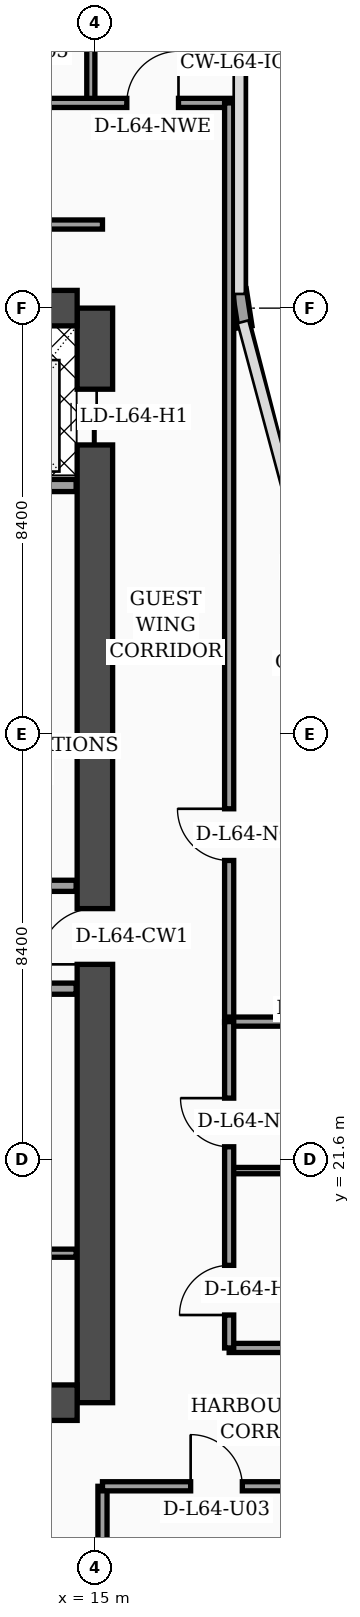
"""IFC4 building model, lengths in metres.
Left out: names, types, materials, properties, quantities, classifications, styles, units other than length and angle.
Written with IfcOpenShell. Run it as: python <this file> out.ifc"""

import sys

from ifc_helpers import new_model, si_unit, direction, frame, frame_2d, origin, place, context, subcontext, project, spatial, rectangle, extrude, element, fill, save


model = new_model("IFC4")
c1 = context("Model", 3, precision=1e-05, world=origin(), true_north=direction((0.0, 1.0)))
c2 = subcontext(c1, "Body", "Model", "MODEL_VIEW")
j1 = project(units=[si_unit("LENGTHUNIT", "METRE"), si_unit("PLANEANGLEUNIT", "RADIAN")], contexts=[c1])
p1 = place(None, origin())
s1 = spatial("IfcSite", under=j1, at=p1, CompositionType="ELEMENT")
p2 = place(p1, origin())
s2 = spatial("IfcBuilding", under=s1, at=p2, CompositionType="ELEMENT")
p3 = place(p2, frame((0.0, 0.0, 259.0)))
s3 = spatial("IfcBuildingStorey", under=s2, at=p3, CompositionType="ELEMENT", Elevation=259.0)
p4 = place(p3, frame((15.0, 16.8, 0.0), z_axis=(0.0, 0.0, 1.0), x_axis=(0.0, 1.0, 0.0)))
e1 = element("IfcWall", 1, at=p4, inside=s3, PredefinedType="SHEAR", context=c2, shape_type="SweptSolid", body=[
    extrude(rectangle(XDim=21.6, YDim=0.7, at=frame_2d((10.8, 0.0))), origin(), (0.0, 0.0, 1.0), 4.05),
])
p5 = place(p4, frame((8.65, 0.0, 0.0)))
e2 = element("IfcOpeningElement", 2, at=p5, cuts=e1, PredefinedType="OPENING", context=c2, shape_type="SweptSolid", body=[
    extrude(rectangle(XDim=1.1, YDim=2.2, at=frame_2d((0.55, 1.1))), frame((0.0, 0.36, 0.0), z_axis=(0.0, -1.0, 0.0), x_axis=(1.0, 0.0, 0.0)), (0.0, 0.0, 1.0), 0.72),
])
p6 = place(p4, frame((18.9, 0.0, 0.0)))
e3 = element("IfcOpeningElement", 3, at=p6, cuts=e1, PredefinedType="OPENING", context=c2, shape_type="SweptSolid", body=[
    extrude(rectangle(XDim=1.1, YDim=2.2, at=frame_2d((0.55, 1.1))), frame((0.0, 0.36, 0.0), z_axis=(0.0, -1.0, 0.0), x_axis=(1.0, 0.0, 0.0)), (0.0, 0.0, 1.0), 0.72),
])
p7 = place(p3, frame((4.55, 38.4, 0.0), z_axis=(0.0, 0.0, 1.0), x_axis=(1.0, 0.0, 0.0)))
e4 = element("IfcWall", 4, at=p7, inside=s3, PredefinedType="SHEAR", context=c2, shape_type="SweptSolid", body=[
    extrude(rectangle(XDim=10.1, YDim=0.7, at=frame_2d((5.05, 0.0))), origin(), (0.0, 0.0, 1.0), 4.05),
])
p8 = place(p7, frame((5.75, 0.0, 0.0)))
e5 = element("IfcOpeningElement", 5, at=p8, cuts=e4, PredefinedType="OPENING", context=c2, shape_type="SweptSolid", body=[
    extrude(rectangle(XDim=1.1, YDim=2.2, at=frame_2d((0.55, 1.1))), frame((0.0, 0.36, 0.0), z_axis=(0.0, -1.0, 0.0), x_axis=(1.0, 0.0, 0.0)), (0.0, 0.0, 1.0), 0.72),
])
p9 = place(p3, frame((4.55, 16.8, 0.0), z_axis=(0.0, 0.0, 1.0), x_axis=(1.0, 0.0, 0.0)))
e6 = element("IfcWall", 6, at=p9, inside=s3, PredefinedType="SHEAR", context=c2, shape_type="SweptSolid", body=[
    extrude(rectangle(XDim=10.1, YDim=0.7, at=frame_2d((5.05, 0.0))), origin(), (0.0, 0.0, 1.0), 4.05),
])
p10 = place(p3, frame((17.962, 38.03, 0.0), z_axis=(0.0, 0.0, 1.0), x_axis=(-0.15141125477, 0.988470855377, 0.0)))
e7 = element("IfcWall", 7, at=p10, inside=s3, PredefinedType="SOLIDWALL", context=c2, shape_type="SweptSolid", body=[
    extrude(rectangle(XDim=0.739, YDim=0.28, at=frame_2d((0.369, 0.0))), origin(), (0.0, 0.0, 1.0), 4.05),
])
p11 = place(p3, frame((9.68, 19.75, 0.0), z_axis=(0.0, 0.0, 1.0), x_axis=(1.0, 0.0, 0.0)))
e8 = element("IfcWall", 8, at=p11, inside=s3, PredefinedType="PARTITIONING", context=c2, shape_type="SweptSolid", body=[
    extrude(rectangle(XDim=4.95, YDim=0.16, at=frame_2d((2.475, 0.0))), origin(), (0.0, 0.0, 1.0), 4.05),
])
p12 = place(p11, frame((1.1, 0.0, 0.0)))
e9 = element("IfcOpeningElement", 9, at=p12, cuts=e8, PredefinedType="OPENING", context=c2, shape_type="SweptSolid", body=[
    extrude(rectangle(XDim=0.98, YDim=2.15, at=frame_2d((0.49, 1.075))), frame((0.0, 0.09, 0.0), z_axis=(0.0, -1.0, 0.0), x_axis=(1.0, 0.0, 0.0)), (0.0, 0.0, 1.0), 0.18),
])
p13 = place(p3, frame((9.68, 24.97, 0.0), z_axis=(0.0, 0.0, 1.0), x_axis=(1.0, 0.0, 0.0)))
e10 = element("IfcWall", 10, at=p13, inside=s3, PredefinedType="SOLIDWALL", context=c2, shape_type="SweptSolid", body=[
    extrude(rectangle(XDim=4.95, YDim=0.22, at=frame_2d((2.475, 0.0))), origin(), (0.0, 0.0, 1.0), 3.5),
])
p14 = place(p13, frame((0.9, 0.0, 0.0)))
e11 = element("IfcOpeningElement", 11, at=p14, cuts=e10, PredefinedType="OPENING", context=c2, shape_type="SweptSolid", body=[
    extrude(rectangle(XDim=0.98, YDim=2.15, at=frame_2d((0.49, 1.075))), frame((0.0, 0.12, 0.0), z_axis=(0.0, -1.0, 0.0), x_axis=(1.0, 0.0, 0.0)), (0.0, 0.0, 1.0), 0.24),
])
p15 = place(p3, frame((12.25, 27.0, 0.0), z_axis=(0.0, 0.0, 1.0), x_axis=(1.0, 0.0, 0.0)))
e12 = element("IfcWall", 12, at=p15, inside=s3, PredefinedType="SOLIDWALL", context=c2, shape_type="SweptSolid", body=[
    extrude(rectangle(XDim=2.38, YDim=0.22, at=frame_2d((1.19, 0.0))), origin(), (0.0, 0.0, 1.0), 4.05),
])
p16 = place(p3, frame((12.25, 29.8, 0.0), z_axis=(0.0, 0.0, 1.0), x_axis=(1.0, 0.0, 0.0)))
e13 = element("IfcWall", 13, at=p16, inside=s3, PredefinedType="PARTITIONING", context=c2, shape_type="SweptSolid", body=[
    extrude(rectangle(XDim=2.38, YDim=0.16, at=frame_2d((1.19, 0.0))), origin(), (0.0, 0.0, 1.0), 4.05),
])
p17 = place(p16, frame((0.55, 0.0, 0.0)))
e14 = element("IfcOpeningElement", 14, at=p17, cuts=e13, PredefinedType="OPENING", context=c2, shape_type="SweptSolid", body=[
    extrude(rectangle(XDim=0.98, YDim=2.15, at=frame_2d((0.49, 1.075))), frame((0.0, 0.09, 0.0), z_axis=(0.0, -1.0, 0.0), x_axis=(1.0, 0.0, 0.0)), (0.0, 0.0, 1.0), 0.18),
])
p18 = place(p3, frame((9.66, 34.9, 0.0), z_axis=(0.0, 0.0, 1.0), x_axis=(1.0, 0.0, 0.0)))
e15 = element("IfcWall", 15, at=p18, inside=s3, PredefinedType="SOLIDWALL", context=c2, shape_type="SweptSolid", body=[
    extrude(rectangle(XDim=4.97, YDim=0.24, at=frame_2d((2.485, 0.0))), origin(), (0.0, 0.0, 1.0), 4.05),
])
p19 = place(p3, frame((15.15, 2.44, 0.0), z_axis=(0.0, 0.0, 1.0), x_axis=(0.0, 1.0, 0.0)))
e16 = element("IfcWall", 16, at=p19, inside=s3, PredefinedType="PARTITIONING", context=c2, shape_type="SweptSolid", body=[
    extrude(rectangle(XDim=12.71, YDim=0.18, at=frame_2d((6.355, 0.0))), origin(), (0.0, 0.0, 1.0), 2.35),
])
p20 = place(p3, frame((15.15, 15.15, 0.0), z_axis=(0.0, 0.0, 1.0), x_axis=(1.0, 0.0, 0.0)))
e17 = element("IfcWall", 17, at=p20, inside=s3, PredefinedType="PARTITIONING", context=c2, shape_type="SweptSolid", body=[
    extrude(rectangle(XDim=6.45, YDim=0.18, at=frame_2d((3.225, 0.0))), origin(), (0.0, 0.0, 1.0), 2.35),
])
p21 = place(p20, frame((1.74, 0.0, 0.0)))
e18 = element("IfcOpeningElement", 18, at=p21, cuts=e17, PredefinedType="OPENING", context=c2, shape_type="SweptSolid", body=[
    extrude(rectangle(XDim=1.02, YDim=2.2, at=frame_2d((0.51, 1.1))), frame((0.0, 0.1, 0.0), z_axis=(0.0, -1.0, 0.0), x_axis=(1.0, 0.0, 0.0)), (0.0, 0.0, 1.0), 0.2),
])
p22 = place(p3, frame((14.92, 42.45, 0.0), z_axis=(0.0, 0.0, 1.0), x_axis=(0.0, 1.0, 0.0)))
e19 = element("IfcWall", 19, at=p22, inside=s3, PredefinedType="PARTITIONING", context=c2, shape_type="SweptSolid", body=[
    extrude(rectangle(XDim=5.35, YDim=0.16, at=frame_2d((2.675, 0.0))), origin(), (0.0, 0.0, 1.0), 3.6),
])
p23 = place(p3, frame((0.08, 42.45, 0.0), z_axis=(0.0, 0.0, 1.0), x_axis=(1.0, 0.0, 0.0)))
e20 = element("IfcWall", 20, at=p23, inside=s3, PredefinedType="PARTITIONING", context=c2, shape_type="SweptSolid", body=[
    extrude(rectangle(XDim=17.77, YDim=0.18, at=frame_2d((8.885, 0.0))), origin(), (0.0, 0.0, 1.0), 3.5),
])
p24 = place(p23, frame((0.9, 0.0, 0.0)))
e21 = element("IfcOpeningElement", 21, at=p24, cuts=e20, PredefinedType="OPENING", context=c2, shape_type="SweptSolid", body=[
    extrude(rectangle(XDim=1.02, YDim=2.2, at=frame_2d((0.51, 1.1))), frame((0.0, 0.1, 0.0), z_axis=(0.0, -1.0, 0.0), x_axis=(1.0, 0.0, 0.0)), (0.0, 0.0, 1.0), 0.2),
])
p25 = place(p23, frame((4.9, 0.0, 0.0)))
e22 = element("IfcOpeningElement", 22, at=p25, cuts=e20, PredefinedType="OPENING", context=c2, shape_type="SweptSolid", body=[
    extrude(rectangle(XDim=1.02, YDim=2.2, at=frame_2d((0.51, 1.1))), frame((0.0, 0.1, 0.0), z_axis=(0.0, -1.0, 0.0), x_axis=(1.0, 0.0, 0.0)), (0.0, 0.0, 1.0), 0.2),
])
p26 = place(p23, frame((10.78, 0.0, 0.0)))
e23 = element("IfcOpeningElement", 23, at=p26, cuts=e20, PredefinedType="OPENING", context=c2, shape_type="SweptSolid", body=[
    extrude(rectangle(XDim=1.02, YDim=2.2, at=frame_2d((0.51, 1.1))), frame((0.0, 0.1, 0.0), z_axis=(0.0, -1.0, 0.0), x_axis=(1.0, 0.0, 0.0)), (0.0, 0.0, 1.0), 0.2),
])
p27 = place(p23, frame((15.55, 0.0, 0.0)))
e24 = element("IfcOpeningElement", 24, at=p27, cuts=e20, PredefinedType="OPENING", context=c2, shape_type="SweptSolid", body=[
    extrude(rectangle(XDim=1.02, YDim=2.2, at=frame_2d((0.51, 1.1))), frame((0.0, 0.1, 0.0), z_axis=(0.0, -1.0, 0.0), x_axis=(1.0, 0.0, 0.0)), (0.0, 0.0, 1.0), 0.2),
])
p28 = place(p3, frame((17.65, 24.3, 0.0), z_axis=(0.0, 0.0, 1.0), x_axis=(0.0, 1.0, 0.0)))
e25 = element("IfcWall", 25, at=p28, inside=s3, PredefinedType="PARTITIONING", context=c2, shape_type="SweptSolid", body=[
    extrude(rectangle(XDim=18.15, YDim=0.18, at=frame_2d((9.075, 0.0))), origin(), (0.0, 0.0, 1.0), 3.5),
])
p29 = place(p28, frame((3.2, 0.0, 0.0)))
e26 = element("IfcOpeningElement", 26, at=p29, cuts=e25, PredefinedType="OPENING", context=c2, shape_type="SweptSolid", body=[
    extrude(rectangle(XDim=1.02, YDim=2.2, at=frame_2d((0.51, 1.1))), frame((0.0, 0.1, 0.0), z_axis=(0.0, -1.0, 0.0), x_axis=(1.0, 0.0, 0.0)), (0.0, 0.0, 1.0), 0.2),
])
p30 = place(p3, frame((3.83, 40.05, 0.0), z_axis=(0.0, 0.0, 1.0), x_axis=(1.0, 0.0, 0.0)))
e27 = element("IfcWall", 27, at=p30, inside=s3, PredefinedType="PARTITIONING", context=c2, shape_type="SweptSolid", body=[
    extrude(rectangle(XDim=11.32, YDim=0.18, at=frame_2d((5.66, 0.0))), origin(), (0.0, 0.0, 1.0), 3.5),
])
p31 = place(p3, frame((17.65, 17.88, 0.0), z_axis=(0.0, 0.0, 1.0), x_axis=(1.0, 0.0, 0.0)))
e28 = element("IfcWall", 28, at=p31, inside=s3, PredefinedType="PARTITIONING", context=c2, shape_type="SweptSolid", body=[
    extrude(rectangle(XDim=3.9, YDim=0.18, at=frame_2d((1.95, 0.0))), origin(), (0.0, 0.0, 1.0), 4.05),
])
p32 = place(p3, frame((17.65, 21.38, 0.0), z_axis=(0.0, 0.0, 1.0), x_axis=(1.0, 0.0, 0.0)))
e29 = element("IfcWall", 29, at=p32, inside=s3, PredefinedType="PARTITIONING", context=c2, shape_type="SweptSolid", body=[
    extrude(rectangle(XDim=3.9, YDim=0.125, at=frame_2d((1.95, 0.0))), origin(), (0.0, 0.0, 1.0), 4.05),
])
p33 = place(p3, frame((17.65, 24.32, 0.0), z_axis=(0.0, 0.0, 1.0), x_axis=(1.0, 0.0, 0.0)))
e30 = element("IfcWall", 30, at=p33, inside=s3, PredefinedType="PARTITIONING", context=c2, shape_type="SweptSolid", body=[
    extrude(rectangle(XDim=3.95, YDim=0.18, at=frame_2d((1.975, 0.0))), origin(), (0.0, 0.0, 1.0), 4.05),
])
p34 = place(p3, frame((17.65, 17.88, 0.0), z_axis=(0.0, 0.0, 1.0), x_axis=(0.0, 1.0, 0.0)))
e31 = element("IfcWall", 31, at=p34, inside=s3, PredefinedType="PARTITIONING", context=c2, shape_type="SweptSolid", body=[
    extrude(rectangle(XDim=6.44, YDim=0.18, at=frame_2d((3.22, 0.0))), origin(), (0.0, 0.0, 1.0), 4.05),
])
p35 = place(p34, frame((0.65, 0.0, 0.0)))
e32 = element("IfcOpeningElement", 32, at=p35, cuts=e31, PredefinedType="OPENING", context=c2, shape_type="SweptSolid", body=[
    extrude(rectangle(XDim=0.98, YDim=2.15, at=frame_2d((0.49, 1.075))), frame((0.0, 0.1, 0.0), z_axis=(0.0, -1.0, 0.0), x_axis=(1.0, 0.0, 0.0)), (0.0, 0.0, 1.0), 0.2),
])
p36 = place(p34, frame((3.97, 0.0, 0.0)))
e33 = element("IfcOpeningElement", 33, at=p36, cuts=e31, PredefinedType="OPENING", context=c2, shape_type="SweptSolid", body=[
    extrude(rectangle(XDim=0.96, YDim=2.2, at=frame_2d((0.48, 1.1))), frame((0.0, 0.1, 0.0), z_axis=(0.0, -1.0, 0.0), x_axis=(1.0, 0.0, 0.0)), (0.0, 0.0, 1.0), 0.2),
])
p37 = place(p21, origin())
e34 = element("IfcDoor", 34, at=p37, inside=s3, OperationType="SINGLE_SWING_LEFT", PredefinedType="DOOR", context=c2, shape_type="SweptSolid", body=[
    extrude(rectangle(XDim=1.02, YDim=2.2, at=frame_2d((0.51, 1.1))), frame((0.0, 0.025, 0.0), z_axis=(0.0, -1.0, 0.0), x_axis=(1.0, 0.0, 0.0)), (0.0, 0.0, 1.0), 0.05),
])
fill(e18, e34)
p38 = place(p27, origin())
e35 = element("IfcDoor", 35, at=p38, inside=s3, OperationType="SINGLE_SWING_RIGHT", PredefinedType="DOOR", context=c2, shape_type="SweptSolid", body=[
    extrude(rectangle(XDim=1.02, YDim=2.2, at=frame_2d((0.51, 1.1))), frame((0.0, 0.025, 0.0), z_axis=(0.0, -1.0, 0.0), x_axis=(1.0, 0.0, 0.0)), (0.0, 0.0, 1.0), 0.05),
])
fill(e24, e35)
p39 = place(p29, origin())
e36 = element("IfcDoor", 36, at=p39, inside=s3, OperationType="SINGLE_SWING_RIGHT", PredefinedType="DOOR", context=c2, shape_type="SweptSolid", body=[
    extrude(rectangle(XDim=1.02, YDim=2.2, at=frame_2d((0.51, 1.1))), frame((0.0, 0.025, 0.0), z_axis=(0.0, -1.0, 0.0), x_axis=(1.0, 0.0, 0.0)), (0.0, 0.0, 1.0), 0.05),
])
fill(e26, e36)
p40 = place(p35, origin())
e37 = element("IfcDoor", 37, at=p40, inside=s3, OperationType="SINGLE_SWING_LEFT", PredefinedType="DOOR", context=c2, shape_type="SweptSolid", body=[
    extrude(rectangle(XDim=0.98, YDim=2.15, at=frame_2d((0.49, 1.075))), frame((0.0, 0.025, 0.0), z_axis=(0.0, -1.0, 0.0), x_axis=(1.0, 0.0, 0.0)), (0.0, 0.0, 1.0), 0.05),
])
fill(e32, e37)
p41 = place(p36, origin())
e38 = element("IfcDoor", 38, at=p41, inside=s3, OperationType="SINGLE_SWING_RIGHT", PredefinedType="DOOR", context=c2, shape_type="SweptSolid", body=[
    extrude(rectangle(XDim=0.96, YDim=2.2, at=frame_2d((0.48, 1.1))), frame((0.0, 0.025, 0.0), z_axis=(0.0, -1.0, 0.0), x_axis=(1.0, 0.0, 0.0)), (0.0, 0.0, 1.0), 0.05),
])
fill(e33, e38)
p42 = place(p5, origin())
e39 = element("IfcDoor", 39, at=p42, inside=s3, OperationType="SINGLE_SWING_LEFT", PredefinedType="DOOR", context=c2, shape_type="SweptSolid", body=[
    extrude(rectangle(XDim=1.1, YDim=2.2, at=frame_2d((0.55, 1.1))), frame((0.0, 0.025, 0.0), z_axis=(0.0, -1.0, 0.0), x_axis=(1.0, 0.0, 0.0)), (0.0, 0.0, 1.0), 0.05),
])
fill(e2, e39)
p43 = place(p6, origin())
e40 = element("IfcDoor", 40, at=p43, inside=s3, OperationType="DOUBLE_DOOR_SLIDING", PredefinedType="DOOR", context=c2, shape_type="SweptSolid", body=[
    extrude(rectangle(XDim=1.1, YDim=2.2, at=frame_2d((0.55, 1.1))), frame((0.0, 0.025, 0.0), z_axis=(0.0, -1.0, 0.0), x_axis=(1.0, 0.0, 0.0)), (0.0, 0.0, 1.0), 0.05),
])
fill(e3, e40)
save(model, sys.argv[1])
